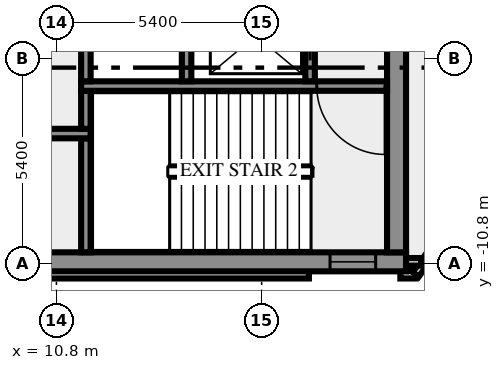
"""IFC4 building model, lengths in metres.
Left out: names, types, materials, properties, quantities, classifications, styles, units other than length and angle.
Written with IfcOpenShell. Run it as: python <this file> out.ifc"""

import sys

from ifc_helpers import new_model, si_unit, direction, frame, frame_2d, origin, place, context, subcontext, project, spatial, rectangle, extrude, element, fill, save


model = new_model("IFC4")
c1 = context("Model", 3, precision=1e-05, world=origin(), true_north=direction((0.0, 1.0)))
c2 = subcontext(c1, "Body", "Model", "MODEL_VIEW")
j1 = project(units=[si_unit("LENGTHUNIT", "METRE"), si_unit("PLANEANGLEUNIT", "RADIAN")], contexts=[c1])
p1 = place(None, origin())
s1 = spatial("IfcSite", under=j1, at=p1, CompositionType="ELEMENT")
p2 = place(p1, origin())
s2 = spatial("IfcBuilding", under=s1, at=p2, CompositionType="ELEMENT")
p3 = place(p2, frame((0.0, 0.0, 285.0)))
s3 = spatial("IfcBuildingStorey", under=s2, at=p3, CompositionType="ELEMENT", Elevation=285.0)
p4 = place(p3, frame((-17.444, -11.088, 0.0), z_axis=(0.0, 0.0, 1.0), x_axis=(1.0, 0.0, 0.0)))
e1 = element("IfcWall", 1, at=p4, inside=s3, PredefinedType="SOLIDWALL", context=c2, shape_type="SweptSolid", body=[
    extrude(rectangle(XDim=34.888, YDim=0.2, at=frame_2d((17.444, 0.0))), origin(), (0.0, 0.0, 1.0), 3.65),
])
p5 = place(p3, frame((19.85, -11.088, 0.0), z_axis=(0.0, 0.0, 1.0), x_axis=(1.0, 0.0, 0.0)))
e2 = element("IfcWall", 2, at=p5, inside=s3, PredefinedType="SOLIDWALL", context=c2, shape_type="SweptSolid", body=[
    extrude(rectangle(XDim=0.406, YDim=0.2, at=frame_2d((0.203, 0.0))), origin(), (0.0, 0.0, 1.0), 3.65),
])
p6 = place(p3, frame((20.253, -11.083, 0.0), z_axis=(0.0, 0.0, 1.0), x_axis=(0.587766567315, 0.809030569476, 0.0)))
e3 = element("IfcWall", 3, at=p6, inside=s3, PredefinedType="SOLIDWALL", context=c2, shape_type="SweptSolid", body=[
    extrude(rectangle(XDim=2.688, YDim=0.2, at=frame_2d((1.344, 0.0))), origin(), (0.0, 0.0, 1.0), 3.65),
])
p7 = place(p3, frame((19.98, -10.75, 0.0), z_axis=(0.0, 0.0, 1.0), x_axis=(1.0, 0.0, 0.0)))
e4 = element("IfcWall", 4, at=p7, inside=s3, PredefinedType="SOLIDWALL", context=c2, shape_type="SweptSolid", body=[
    extrude(rectangle(XDim=0.417, YDim=0.2, at=frame_2d((0.208, 0.0))), origin(), (0.0, 0.0, 1.0), 3.65),
])
p8 = place(p3, frame((-20.0, -10.75, 0.0), z_axis=(0.0, 0.0, 1.0), x_axis=(1.0, 0.0, 0.0)))
e5 = element("IfcWall", 5, at=p8, inside=s3, PredefinedType="SHEAR", context=c2, shape_type="SweptSolid", body=[
    extrude(rectangle(XDim=40.0, YDim=0.5, at=frame_2d((20.0, 0.0))), origin(), (0.0, 0.0, 1.0), 3.65),
])
p9 = place(p8, frame((0.8, 0.0, 1.0)))
e6 = element("IfcOpeningElement", 6, at=p9, cuts=e5, PredefinedType="OPENING", context=c2, shape_type="SweptSolid", body=[
    extrude(rectangle(XDim=1.2, YDim=1.2, at=frame_2d((0.6, 0.6))), frame((0.0, 0.26, 0.0), z_axis=(0.0, -1.0, 0.0), x_axis=(1.0, 0.0, 0.0)), (0.0, 0.0, 1.0), 0.52),
])
p10 = place(p8, frame((38.0, 0.0, 1.0)))
e7 = element("IfcOpeningElement", 7, at=p10, cuts=e5, PredefinedType="OPENING", context=c2, shape_type="SweptSolid", body=[
    extrude(rectangle(XDim=1.2, YDim=1.2, at=frame_2d((0.6, 0.6))), frame((0.0, 0.26, 0.0), z_axis=(0.0, -1.0, 0.0), x_axis=(1.0, 0.0, 0.0)), (0.0, 0.0, 1.0), 0.52),
])
p11 = place(p3, frame((11.575, -10.5, 0.0), z_axis=(0.0, 0.0, 1.0), x_axis=(0.0, 1.0, 0.0)))
e8 = element("IfcWall", 8, at=p11, inside=s3, PredefinedType="SHEAR", context=c2, shape_type="SweptSolid", body=[
    extrude(rectangle(XDim=3.0, YDim=0.25, at=frame_2d((1.5, 0.0))), origin(), (0.0, 0.0, 1.0), 3.65),
])
p12 = place(p3, frame((19.75, -10.5, 0.0), z_axis=(0.0, 0.0, 1.0), x_axis=(0.0, 1.0, 0.0)))
e9 = element("IfcWall", 9, at=p12, inside=s3, PredefinedType="SHEAR", context=c2, shape_type="SweptSolid", body=[
    extrude(rectangle(XDim=8.8, YDim=0.5, at=frame_2d((4.4, 0.0))), origin(), (0.0, 0.0, 1.0), 3.65),
])
p13 = place(p3, frame((11.7, -7.375, 0.0), z_axis=(0.0, 0.0, 1.0), x_axis=(-1.0, 0.0, 0.0)))
e10 = element("IfcWall", 10, at=p13, inside=s3, PredefinedType="SHEAR", context=c2, shape_type="SweptSolid", body=[
    extrude(rectangle(XDim=23.4, YDim=0.25, at=frame_2d((11.7, 0.0))), origin(), (0.0, 0.0, 1.0), 3.65),
])
p14 = place(p13, frame((22.225, 0.0, 0.0)))
e11 = element("IfcOpeningElement", 11, at=p14, cuts=e10, PredefinedType="OPENING", context=c2, shape_type="SweptSolid", body=[
    extrude(rectangle(XDim=0.8, YDim=2.1, at=frame_2d((0.4, 1.05))), frame((0.0, 0.135, 0.0), z_axis=(0.0, -1.0, 0.0), x_axis=(1.0, 0.0, 0.0)), (0.0, 0.0, 1.0), 0.27),
])
p15 = place(p13, frame((20.2, 0.0, 0.0)))
e12 = element("IfcOpeningElement", 12, at=p15, cuts=e10, PredefinedType="OPENING", context=c2, shape_type="SweptSolid", body=[
    extrude(rectangle(XDim=1.1, YDim=2.1, at=frame_2d((0.55, 1.05))), frame((0.0, 0.135, 0.0), z_axis=(0.0, -1.0, 0.0), x_axis=(1.0, 0.0, 0.0)), (0.0, 0.0, 1.0), 0.27),
])
p16 = place(p13, frame((17.7, 0.0, 0.0)))
e13 = element("IfcOpeningElement", 13, at=p16, cuts=e10, PredefinedType="OPENING", context=c2, shape_type="SweptSolid", body=[
    extrude(rectangle(XDim=1.1, YDim=2.1, at=frame_2d((0.55, 1.05))), frame((0.0, 0.135, 0.0), z_axis=(0.0, -1.0, 0.0), x_axis=(1.0, 0.0, 0.0)), (0.0, 0.0, 1.0), 0.27),
])
p17 = place(p13, frame((15.975, 0.0, 0.0)))
e14 = element("IfcOpeningElement", 14, at=p17, cuts=e10, PredefinedType="OPENING", context=c2, shape_type="SweptSolid", body=[
    extrude(rectangle(XDim=0.8, YDim=2.1, at=frame_2d((0.4, 1.05))), frame((0.0, 0.135, 0.0), z_axis=(0.0, -1.0, 0.0), x_axis=(1.0, 0.0, 0.0)), (0.0, 0.0, 1.0), 0.27),
])
p18 = place(p13, frame((14.5, 0.0, 0.0)))
e15 = element("IfcOpeningElement", 15, at=p18, cuts=e10, PredefinedType="OPENING", context=c2, shape_type="SweptSolid", body=[
    extrude(rectangle(XDim=0.9, YDim=2.1, at=frame_2d((0.45, 1.05))), frame((0.0, 0.135, 0.0), z_axis=(0.0, -1.0, 0.0), x_axis=(1.0, 0.0, 0.0)), (0.0, 0.0, 1.0), 0.27),
])
p19 = place(p13, frame((12.95, 0.0, 0.0)))
e16 = element("IfcOpeningElement", 16, at=p19, cuts=e10, PredefinedType="OPENING", context=c2, shape_type="SweptSolid", body=[
    extrude(rectangle(XDim=0.9, YDim=2.1, at=frame_2d((0.45, 1.05))), frame((0.0, 0.135, 0.0), z_axis=(0.0, -1.0, 0.0), x_axis=(1.0, 0.0, 0.0)), (0.0, 0.0, 1.0), 0.27),
])
p20 = place(p13, frame((11.475, 0.0, 0.0)))
e17 = element("IfcOpeningElement", 17, at=p20, cuts=e10, PredefinedType="OPENING", context=c2, shape_type="SweptSolid", body=[
    extrude(rectangle(XDim=0.9, YDim=2.1, at=frame_2d((0.45, 1.05))), frame((0.0, 0.135, 0.0), z_axis=(0.0, -1.0, 0.0), x_axis=(1.0, 0.0, 0.0)), (0.0, 0.0, 1.0), 0.27),
])
p21 = place(p13, frame((10.45, 0.0, 0.0)))
e18 = element("IfcOpeningElement", 18, at=p21, cuts=e10, PredefinedType="OPENING", context=c2, shape_type="SweptSolid", body=[
    extrude(rectangle(XDim=0.5, YDim=2.1, at=frame_2d((0.25, 1.05))), frame((0.0, 0.135, 0.0), z_axis=(0.0, -1.0, 0.0), x_axis=(1.0, 0.0, 0.0)), (0.0, 0.0, 1.0), 0.27),
])
p22 = place(p13, frame((7.987, 0.0, 0.0)))
e19 = element("IfcOpeningElement", 19, at=p22, cuts=e10, PredefinedType="OPENING", context=c2, shape_type="SweptSolid", body=[
    extrude(rectangle(XDim=0.9, YDim=2.1, at=frame_2d((0.45, 1.05))), frame((0.0, 0.135, 0.0), z_axis=(0.0, -1.0, 0.0), x_axis=(1.0, 0.0, 0.0)), (0.0, 0.0, 1.0), 0.27),
])
p23 = place(p13, frame((3.012, 0.0, 0.0)))
e20 = element("IfcOpeningElement", 20, at=p23, cuts=e10, PredefinedType="OPENING", context=c2, shape_type="SweptSolid", body=[
    extrude(rectangle(XDim=0.9, YDim=2.1, at=frame_2d((0.45, 1.05))), frame((0.0, 0.135, 0.0), z_axis=(0.0, -1.0, 0.0), x_axis=(1.0, 0.0, 0.0)), (0.0, 0.0, 1.0), 0.27),
])
p24 = place(p3, frame((11.575, -7.25, 0.0), z_axis=(0.0, 0.0, 1.0), x_axis=(0.0, 1.0, 0.0)))
e21 = element("IfcWall", 21, at=p24, inside=s3, PredefinedType="SHEAR", context=c2, shape_type="SweptSolid", body=[
    extrude(rectangle(XDim=1.0, YDim=0.25, at=frame_2d((0.5, 0.0))), origin(), (0.0, 0.0, 1.0), 3.65),
])
p25 = place(p3, frame((19.5, -6.125, 0.0), z_axis=(0.0, 0.0, 1.0), x_axis=(-1.0, 0.0, 0.0)))
e22 = element("IfcWall", 22, at=p25, inside=s3, PredefinedType="SHEAR", context=c2, shape_type="SweptSolid", body=[
    extrude(rectangle(XDim=8.05, YDim=0.25, at=frame_2d((4.025, 0.0))), origin(), (0.0, 0.0, 1.0), 3.65),
])
p26 = place(p25, frame((0.05, 0.0, 0.0)))
e23 = element("IfcOpeningElement", 23, at=p26, cuts=e22, PredefinedType="OPENING", context=c2, shape_type="SweptSolid", body=[
    extrude(rectangle(XDim=1.8, YDim=2.1, at=frame_2d((0.9, 1.05))), frame((0.0, 0.135, 0.0), z_axis=(0.0, -1.0, 0.0), x_axis=(1.0, 0.0, 0.0)), (0.0, 0.0, 1.0), 0.27),
])
p27 = place(p3, frame((11.575, -6.0, 0.0), z_axis=(0.0, 0.0, 1.0), x_axis=(0.0, 1.0, 0.0)))
e24 = element("IfcWall", 24, at=p27, inside=s3, PredefinedType="SHEAR", context=c2, shape_type="SweptSolid", body=[
    extrude(rectangle(XDim=1.75, YDim=0.25, at=frame_2d((0.875, 0.0))), origin(), (0.0, 0.0, 1.0), 3.65),
])
p28 = place(p3, frame((14.225, -6.0, 0.0), z_axis=(0.0, 0.0, 1.0), x_axis=(0.0, 1.0, 0.0)))
e25 = element("IfcWall", 25, at=p28, inside=s3, PredefinedType="SHEAR", context=c2, shape_type="SweptSolid", body=[
    extrude(rectangle(XDim=4.3, YDim=0.25, at=frame_2d((2.15, 0.0))), origin(), (0.0, 0.0, 1.0), 3.65),
])
p29 = place(p3, frame((17.475, -6.0, 0.0), z_axis=(0.0, 0.0, 1.0), x_axis=(0.0, 1.0, 0.0)))
e26 = element("IfcWall", 26, at=p29, inside=s3, PredefinedType="SHEAR", context=c2, shape_type="SweptSolid", body=[
    extrude(rectangle(XDim=4.3, YDim=0.25, at=frame_2d((2.15, 0.0))), origin(), (0.0, 0.0, 1.0), 3.65),
])
p30 = place(p29, frame((0.55, 0.0, 0.0)))
e27 = element("IfcOpeningElement", 27, at=p30, cuts=e26, PredefinedType="OPENING", context=c2, shape_type="SweptSolid", body=[
    extrude(rectangle(XDim=1.3, YDim=2.1, at=frame_2d((0.65, 1.05))), frame((0.0, 0.135, 0.0), z_axis=(0.0, -1.0, 0.0), x_axis=(1.0, 0.0, 0.0)), (0.0, 0.0, 1.0), 0.27),
])
p31 = place(p10, origin())
e28 = element("IfcWindow", 28, at=p31, inside=s3, PartitioningType="SINGLE_PANEL", PredefinedType="WINDOW", context=c2, shape_type="SweptSolid", body=[
    extrude(rectangle(XDim=1.2, YDim=1.2, at=frame_2d((0.6, 0.6))), frame((0.0, 0.03, 0.0), z_axis=(0.0, -1.0, 0.0), x_axis=(1.0, 0.0, 0.0)), (0.0, 0.0, 1.0), 0.06),
])
fill(e7, e28)
p32 = place(p26, origin())
e29 = element("IfcDoor", 29, at=p32, inside=s3, OperationType="DOUBLE_DOOR_SINGLE_SWING", PredefinedType="DOOR", context=c2, shape_type="SweptSolid", body=[
    extrude(rectangle(XDim=1.8, YDim=2.1, at=frame_2d((0.9, 1.05))), frame((0.0, 0.025, 0.0), z_axis=(0.0, -1.0, 0.0), x_axis=(1.0, 0.0, 0.0)), (0.0, 0.0, 1.0), 0.05),
])
fill(e23, e29)
p33 = place(p30, origin())
e30 = element("IfcDoor", 30, at=p33, inside=s3, OperationType="DOUBLE_DOOR_SLIDING", PredefinedType="DOOR", context=c2, shape_type="SweptSolid", body=[
    extrude(rectangle(XDim=1.3, YDim=2.1, at=frame_2d((0.65, 1.05))), frame((0.0, 0.025, 0.0), z_axis=(0.0, -1.0, 0.0), x_axis=(1.0, 0.0, 0.0)), (0.0, 0.0, 1.0), 0.05),
])
fill(e27, e30)
save(model, sys.argv[1])
